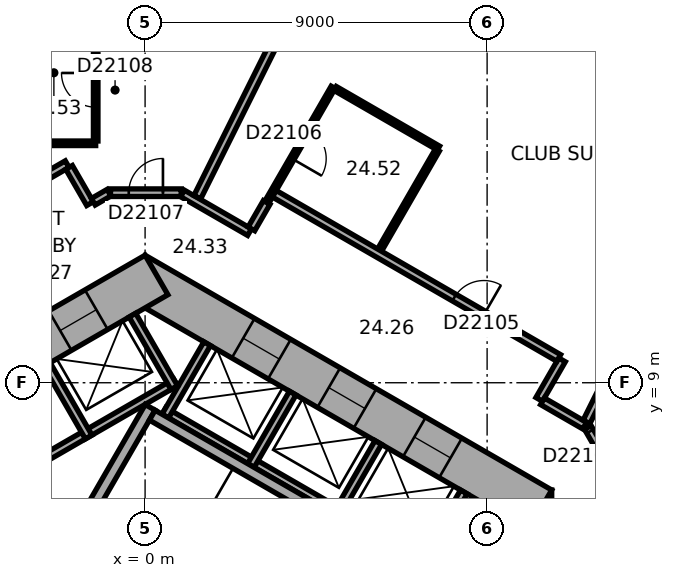
"""IFC4 building model, lengths in metres.
Left out: names, types, materials, properties, quantities, classifications, styles, units other than length and angle.
Written with IfcOpenShell. Run it as: python <this file> out.ifc"""

import sys

from ifc_helpers import new_model, si_unit, direction, frame, frame_2d, origin, place, context, subcontext, project, spatial, rectangle, extrude, element, fill, save


model = new_model("IFC4")
c1 = context("Model", 3, precision=1e-05, world=origin(), true_north=direction((0.0, 1.0)))
c2 = subcontext(c1, "Body", "Model", "MODEL_VIEW")
j1 = project(units=[si_unit("LENGTHUNIT", "METRE"), si_unit("PLANEANGLEUNIT", "RADIAN")], contexts=[c1])
p1 = place(None, origin())
s1 = spatial("IfcSite", under=j1, at=p1, CompositionType="ELEMENT")
p2 = place(p1, origin())
s2 = spatial("IfcBuilding", under=s1, at=p2, CompositionType="ELEMENT")
p3 = place(p2, frame((0.0, 0.0, 103.4)))
s3 = spatial("IfcBuildingStorey", under=s2, at=p3, CompositionType="ELEMENT", Elevation=103.4)
p4 = place(p3, frame((10.1, -6.177, 0.0), z_axis=(0.0, 0.0, 1.0), x_axis=(0.0, 1.0, 0.0)))
e1 = element("IfcWall", 1, at=p4, inside=s3, PredefinedType="SHEAR", context=c2, shape_type="SweptSolid", body=[
    extrude(rectangle(XDim=12.355, YDim=1.2, at=frame_2d((6.177, 0.0))), origin(), (0.0, 0.0, 1.0), 3.3),
])
p5 = place(p4, frame((6.378, 0.0, 0.0)))
e2 = element("IfcOpeningElement", 2, at=p5, cuts=e1, PredefinedType="OPENING", context=c2, shape_type="SweptSolid", body=[
    extrude(rectangle(XDim=1.5, YDim=2.1, at=frame_2d((0.75, 1.05))), frame((0.0, 0.61, 0.0), z_axis=(0.0, -1.0, 0.0), x_axis=(1.0, 0.0, 0.0)), (0.0, 0.0, 1.0), 1.22),
])
p6 = place(p4, frame((1.828, 0.0, 0.0)))
e3 = element("IfcOpeningElement", 3, at=p6, cuts=e1, PredefinedType="OPENING", context=c2, shape_type="SweptSolid", body=[
    extrude(rectangle(XDim=1.1, YDim=2.1, at=frame_2d((0.55, 1.05))), frame((0.0, 0.61, 0.0), z_axis=(0.0, -1.0, 0.0), x_axis=(1.0, 0.0, 0.0)), (0.0, 0.0, 1.0), 1.22),
])
p7 = place(p4, frame((4.427, 0.0, 0.0)))
e4 = element("IfcOpeningElement", 4, at=p7, cuts=e1, PredefinedType="OPENING", context=c2, shape_type="SweptSolid", body=[
    extrude(rectangle(XDim=1.1, YDim=2.1, at=frame_2d((0.55, 1.05))), frame((0.0, 0.61, 0.0), z_axis=(0.0, -1.0, 0.0), x_axis=(1.0, 0.0, 0.0)), (0.0, 0.0, 1.0), 1.22),
])
p8 = place(p3, frame((10.4, 5.658, 0.0), z_axis=(0.0, 0.0, 1.0), x_axis=(-0.866021384402, 0.500006961711, 0.0)))
e5 = element("IfcWall", 5, at=p8, inside=s3, PredefinedType="SHEAR", context=c2, shape_type="SweptSolid", body=[
    extrude(rectangle(XDim=12.355, YDim=1.2, at=frame_2d((6.178, 0.0))), origin(), (0.0, 0.0, 1.0), 3.3),
])
p9 = place(p8, frame((2.728, 0.0, 0.0)))
e6 = element("IfcOpeningElement", 6, at=p9, cuts=e5, PredefinedType="OPENING", context=c2, shape_type="SweptSolid", body=[
    extrude(rectangle(XDim=1.1, YDim=2.1, at=frame_2d((0.55, 1.05))), frame((0.0, 0.61, 0.0), z_axis=(0.0, -1.0, 0.0), x_axis=(1.0, 0.0, 0.0)), (0.0, 0.0, 1.0), 1.22),
])
p10 = place(p8, frame((5.328, 0.0, 0.0)))
e7 = element("IfcOpeningElement", 7, at=p10, cuts=e5, PredefinedType="OPENING", context=c2, shape_type="SweptSolid", body=[
    extrude(rectangle(XDim=1.1, YDim=2.1, at=frame_2d((0.55, 1.05))), frame((0.0, 0.61, 0.0), z_axis=(0.0, -1.0, 0.0), x_axis=(1.0, 0.0, 0.0)), (0.0, 0.0, 1.0), 1.22),
])
p11 = place(p8, frame((7.928, 0.0, 0.0)))
e8 = element("IfcOpeningElement", 8, at=p11, cuts=e5, PredefinedType="OPENING", context=c2, shape_type="SweptSolid", body=[
    extrude(rectangle(XDim=1.1, YDim=2.1, at=frame_2d((0.55, 1.05))), frame((0.0, 0.61, 0.0), z_axis=(0.0, -1.0, 0.0), x_axis=(1.0, 0.0, 0.0)), (0.0, 0.0, 1.0), 1.22),
])
p12 = place(p3, frame((0.3, 11.836, 0.0), z_axis=(0.0, 0.0, 1.0), x_axis=(-0.866021384402, -0.500006961711, 0.0)))
e9 = element("IfcWall", 9, at=p12, inside=s3, PredefinedType="SHEAR", context=c2, shape_type="SweptSolid", body=[
    extrude(rectangle(XDim=12.355, YDim=1.2, at=frame_2d((6.178, 0.0))), origin(), (0.0, 0.0, 1.0), 3.3),
])
p13 = place(p12, frame((6.378, 0.0, 0.0)))
e10 = element("IfcOpeningElement", 10, at=p13, cuts=e9, PredefinedType="OPENING", context=c2, shape_type="SweptSolid", body=[
    extrude(rectangle(XDim=1.5, YDim=2.1, at=frame_2d((0.75, 1.05))), frame((0.0, 0.61, 0.0), z_axis=(0.0, -1.0, 0.0), x_axis=(1.0, 0.0, 0.0)), (0.0, 0.0, 1.0), 1.22),
])
p14 = place(p12, frame((1.828, 0.0, 0.0)))
e11 = element("IfcOpeningElement", 11, at=p14, cuts=e9, PredefinedType="OPENING", context=c2, shape_type="SweptSolid", body=[
    extrude(rectangle(XDim=1.1, YDim=2.1, at=frame_2d((0.55, 1.05))), frame((0.0, 0.61, 0.0), z_axis=(0.0, -1.0, 0.0), x_axis=(1.0, 0.0, 0.0)), (0.0, 0.0, 1.0), 1.22),
])
p15 = place(p3, frame((20.63, 15.47, 0.0), z_axis=(0.0, 0.0, 1.0), x_axis=(-0.894934518609, 0.446197498203, 0.0)))
e12 = element("IfcWall", 12, at=p15, inside=s3, PredefinedType="STANDARD", context=c2, shape_type="SweptSolid", body=[
    extrude(rectangle(XDim=21.246, YDim=0.2, at=frame_2d((10.623, 0.0))), origin(), (0.0, 0.0, 1.0), 3.3),
])
p16 = place(p15, frame((1.553, 0.0, 0.8)))
e13 = element("IfcOpeningElement", 13, at=p16, cuts=e12, PredefinedType="OPENING", context=c2, shape_type="SweptSolid", body=[
    extrude(rectangle(XDim=2.4, YDim=1.7, at=frame_2d((1.2, 0.85))), frame((0.0, 0.11, 0.0), z_axis=(0.0, -1.0, 0.0), x_axis=(1.0, 0.0, 0.0)), (0.0, 0.0, 1.0), 0.22),
])
p17 = place(p15, frame((5.488, 0.0, 0.8)))
e14 = element("IfcOpeningElement", 14, at=p17, cuts=e12, PredefinedType="OPENING", context=c2, shape_type="SweptSolid", body=[
    extrude(rectangle(XDim=2.4, YDim=1.7, at=frame_2d((1.2, 0.85))), frame((0.0, 0.11, 0.0), z_axis=(0.0, -1.0, 0.0), x_axis=(1.0, 0.0, 0.0)), (0.0, 0.0, 1.0), 0.22),
])
p18 = place(p15, frame((9.422, 0.0, 0.8)))
e15 = element("IfcOpeningElement", 15, at=p18, cuts=e12, PredefinedType="OPENING", context=c2, shape_type="SweptSolid", body=[
    extrude(rectangle(XDim=2.4, YDim=1.7, at=frame_2d((1.2, 0.85))), frame((0.0, 0.11, 0.0), z_axis=(0.0, -1.0, 0.0), x_axis=(1.0, 0.0, 0.0)), (0.0, 0.0, 1.0), 0.22),
])
p19 = place(p15, frame((13.357, 0.0, 0.8)))
e16 = element("IfcOpeningElement", 16, at=p19, cuts=e12, PredefinedType="OPENING", context=c2, shape_type="SweptSolid", body=[
    extrude(rectangle(XDim=2.4, YDim=1.7, at=frame_2d((1.2, 0.85))), frame((0.0, 0.11, 0.0), z_axis=(0.0, -1.0, 0.0), x_axis=(1.0, 0.0, 0.0)), (0.0, 0.0, 1.0), 0.22),
])
p20 = place(p15, frame((17.292, 0.0, 0.8)))
e17 = element("IfcOpeningElement", 17, at=p20, cuts=e12, PredefinedType="OPENING", context=c2, shape_type="SweptSolid", body=[
    extrude(rectangle(XDim=2.4, YDim=1.7, at=frame_2d((1.2, 0.85))), frame((0.0, 0.11, 0.0), z_axis=(0.0, -1.0, 0.0), x_axis=(1.0, 0.0, 0.0)), (0.0, 0.0, 1.0), 0.22),
])
p21 = place(p3, frame((7.424, 4.259, 0.0), z_axis=(0.0, 0.0, 1.0), x_axis=(-0.866026010844, 0.49999894854, 0.0)))
e18 = element("IfcWall", 18, at=p21, inside=s3, PredefinedType="PARTITIONING", context=c2, shape_type="SweptSolid", body=[
    extrude(rectangle(XDim=8.0, YDim=0.2, at=frame_2d((4.0, 0.0))), origin(), (0.0, 0.0, 1.0), 3.05),
])
for number, where, z_axis, x_axis in (
    (19, (7.287, 4.222, 0.0), (0.0, 0.0, 1.0), (0.5, 0.866, 0.0)),
    (20, (5.036, 5.522, 0.0), (0.0, 0.0, 1.0), (0.5, 0.866, 0.0)),
    (21, (2.784, 6.822, 0.0), (0.0, 0.0, 1.0), (0.5, 0.866, 0.0)),
    (22, (0.532, 8.122, 0.0), (0.0, 0.0, 1.0), (0.5, 0.866, 0.0)),
):
    element("IfcWall", number, at=place(p3, frame(where, z_axis=z_axis, x_axis=x_axis)), inside=s3, PredefinedType="PARTITIONING", context=c2, shape_type="SweptSolid", body=[
        extrude(rectangle(XDim=2.2, YDim=0.2, at=frame_2d((1.1, 0.0))), origin(), (0.0, 0.0, 1.0), 3.05),
    ])
p22 = place(p3, frame((0.803, 9.009, 0.0), z_axis=(0.0, 0.0, 1.0), x_axis=(-0.866028230842, -0.499995103361, 0.0)))
e23 = element("IfcWall", 23, at=p22, inside=s3, PredefinedType="PARTITIONING", context=c2, shape_type="SweptSolid", body=[
    extrude(rectangle(XDim=5.4, YDim=0.2, at=frame_2d((2.7, 0.0))), origin(), (0.0, 0.0, 1.0), 3.05),
])
p23 = place(p3, frame((0.767, 8.872, 0.0), z_axis=(0.0, 0.0, 1.0), x_axis=(-0.499994660107, 0.866028486751, 0.0)))
e24 = element("IfcWall", 24, at=p23, inside=s3, PredefinedType="PARTITIONING", context=c2, shape_type="SweptSolid", body=[
    extrude(rectangle(XDim=2.2, YDim=0.2, at=frame_2d((1.1, 0.0))), origin(), (0.0, 0.0, 1.0), 3.05),
])
p24 = place(p3, frame((-1.485, 7.572, 0.0), z_axis=(0.0, 0.0, 1.0), x_axis=(-0.50002983664, 0.866008176907, 0.0)))
e25 = element("IfcWall", 25, at=p24, inside=s3, PredefinedType="PARTITIONING", context=c2, shape_type="SweptSolid", body=[
    extrude(rectangle(XDim=2.2, YDim=0.2, at=frame_2d((1.1, 0.0))), origin(), (0.0, 0.0, 1.0), 3.05),
])
p25 = place(p3, frame((-2.216, 4.282, 0.0), z_axis=(0.0, 0.0, 1.0), x_axis=(0.499977259774, 0.866038532462, 0.0)))
e26 = element("IfcWall", 26, at=p25, inside=s3, PredefinedType="SHEAR", context=c2, shape_type="SweptSolid", body=[
    extrude(rectangle(XDim=4.7, YDim=0.3, at=frame_2d((2.35, 0.0))), origin(), (0.0, 0.0, 1.0), 3.05),
])
p26 = place(p3, frame((6.303, 4.617, 0.0), z_axis=(0.0, 0.0, 1.0), x_axis=(-0.866027801685, 0.499995846692, 0.0)))
e27 = element("IfcWall", 27, at=p26, inside=s3, PredefinedType="SHEAR", context=c2, shape_type="SweptSolid", body=[
    extrude(rectangle(XDim=7.06, YDim=0.3, at=frame_2d((3.53, 0.0))), origin(), (0.0, 0.0, 1.0), 3.05),
])
p27 = place(p3, frame((-2.05, 14.752, 0.0), z_axis=(0.0, 0.0, 1.0), x_axis=(-0.866030936828, -0.499990416364, 0.0)))
e28 = element("IfcWall", 28, at=p27, inside=s3, PredefinedType="PARTITIONING", context=c2, shape_type="SweptSolid", body=[
    extrude(rectangle(XDim=3.102, YDim=0.2, at=frame_2d((1.551, 0.0))), origin(), (0.0, 0.0, 1.0), 3.05),
])
p28 = place(p3, frame((-1.449, 13.712, 0.0), z_axis=(0.0, 0.0, 1.0), x_axis=(-0.499978356969, 0.866037899034, 0.0)))
e29 = element("IfcWall", 29, at=p28, inside=s3, PredefinedType="PARTITIONING", context=c2, shape_type="SweptSolid", body=[
    extrude(rectangle(XDim=1.101, YDim=0.2, at=frame_2d((0.551, 0.0))), origin(), (0.0, 0.0, 1.0), 3.05),
])
p29 = place(p3, frame((-1.3, 15.301, 0.0), z_axis=(0.0, 0.0, 1.0), x_axis=(-1.0, 0.0, 0.0)))
e30 = element("IfcWall", 30, at=p29, inside=s3, PredefinedType="PARTITIONING", context=c2, shape_type="SweptSolid", body=[
    extrude(rectangle(XDim=1.661, YDim=0.12, at=frame_2d((0.831, 0.0))), origin(), (0.0, 0.0, 1.0), 3.05),
])
p30 = place(p3, frame((-1.3, 18.041, 0.0), z_axis=(0.0, 0.0, 1.0), x_axis=(0.0, -1.0, 0.0)))
e31 = element("IfcWall", 31, at=p30, inside=s3, PredefinedType="PARTITIONING", context=c2, shape_type="SweptSolid", body=[
    extrude(rectangle(XDim=2.68, YDim=0.12, at=frame_2d((1.34, 0.0))), origin(), (0.0, 0.0, 1.0), 3.05),
])
p31 = place(p30, frame((0.89, 0.0, 0.0)))
e32 = element("IfcOpeningElement", 32, at=p31, cuts=e31, PredefinedType="OPENING", context=c2, shape_type="SweptSolid", body=[
    extrude(rectangle(XDim=0.9, YDim=2.1, at=frame_2d((0.45, 1.05))), frame((0.0, 0.07, 0.0), z_axis=(0.0, -1.0, 0.0), x_axis=(1.0, 0.0, 0.0)), (0.0, 0.0, 1.0), 0.14),
])
p32 = place(p3, frame((-0.95, 14.001, 0.0), z_axis=(0.0, 0.0, 1.0), x_axis=(-0.86609177584, -0.499885022602, 0.0)))
e33 = element("IfcWall", 33, at=p32, inside=s3, PredefinedType="PARTITIONING", context=c2, shape_type="SweptSolid", body=[
    extrude(rectangle(XDim=0.477, YDim=0.2, at=frame_2d((0.238, 0.0))), origin(), (0.0, 0.0, 1.0), 3.05),
])
p33 = place(p3, frame((0.95, 14.001, 0.0), z_axis=(0.0, 0.0, 1.0), x_axis=(-1.0, 0.0, 0.0)))
e34 = element("IfcWall", 34, at=p33, inside=s3, PredefinedType="PARTITIONING", context=c2, shape_type="SweptSolid", body=[
    extrude(rectangle(XDim=1.86, YDim=0.2, at=frame_2d((0.93, 0.0))), origin(), (0.0, 0.0, 1.0), 3.05),
])
p34 = place(p33, frame((0.48, 0.0, 0.0)))
e35 = element("IfcOpeningElement", 35, at=p34, cuts=e34, PredefinedType="OPENING", context=c2, shape_type="SweptSolid", body=[
    extrude(rectangle(XDim=0.9, YDim=2.1, at=frame_2d((0.45, 1.05))), frame((0.0, 0.11, 0.0), z_axis=(0.0, -1.0, 0.0), x_axis=(1.0, 0.0, 0.0)), (0.0, 0.0, 1.0), 0.22),
])
p35 = place(p3, frame((2.748, 12.962, 0.0), z_axis=(0.0, 0.0, 1.0), x_axis=(-0.866013897511, 0.50001992892, 0.0)))
e36 = element("IfcWall", 36, at=p35, inside=s3, PredefinedType="PARTITIONING", context=c2, shape_type="SweptSolid", body=[
    extrude(rectangle(XDim=2.037, YDim=0.2, at=frame_2d((1.018, 0.0))), origin(), (0.0, 0.0, 1.0), 3.05),
])
p36 = place(p3, frame((3.199, 13.743, 0.0), z_axis=(0.0, 0.0, 1.0), x_axis=(-0.500170954823, -0.865926680471, 0.0)))
e37 = element("IfcWall", 37, at=p36, inside=s3, PredefinedType="PARTITIONING", context=c2, shape_type="SweptSolid", body=[
    extrude(rectangle(XDim=0.801, YDim=0.2, at=frame_2d((0.4, 0.0))), origin(), (0.0, 0.0, 1.0), 3.05),
])
p37 = place(p3, frame((3.232, 13.8, 0.0), z_axis=(0.0, 0.0, 1.0), x_axis=(0.499993265928, 0.866029291668, 0.0)))
e38 = element("IfcWall", 38, at=p37, inside=s3, PredefinedType="PARTITIONING", context=c2, shape_type="SweptSolid", body=[
    extrude(rectangle(XDim=3.434, YDim=0.12, at=frame_2d((1.717, 0.0))), origin(), (0.0, 0.0, 1.0), 3.05),
])
p38 = place(p37, frame((1.267, 0.0, 0.0)))
e39 = element("IfcOpeningElement", 39, at=p38, cuts=e38, PredefinedType="OPENING", context=c2, shape_type="SweptSolid", body=[
    extrude(rectangle(XDim=0.9, YDim=2.1, at=frame_2d((0.45, 1.05))), frame((0.0, 0.07, 0.0), z_axis=(0.0, -1.0, 0.0), x_axis=(1.0, 0.0, 0.0)), (0.0, 0.0, 1.0), 0.14),
])
p39 = place(p3, frame((5.001, 16.744, 0.0), z_axis=(0.0, 0.0, 1.0), x_axis=(0.866009488468, -0.500027565123, 0.0)))
e40 = element("IfcWall", 40, at=p39, inside=s3, PredefinedType="PARTITIONING", context=c2, shape_type="SweptSolid", body=[
    extrude(rectangle(XDim=3.14, YDim=0.12, at=frame_2d((1.57, 0.0))), origin(), (0.0, 0.0, 1.0), 3.05),
])
p40 = place(p3, frame((5.351, 21.859, 0.0), z_axis=(0.0, 0.0, 1.0), x_axis=(-0.446205309328, -0.894930624086, 0.0)))
e41 = element("IfcWall", 41, at=p40, inside=s3, PredefinedType="PARTITIONING", context=c2, shape_type="SweptSolid", body=[
    extrude(rectangle(XDim=8.913, YDim=0.2, at=frame_2d((4.457, 0.0))), origin(), (0.0, 0.0, 1.0), 2.6),
])
p41 = place(p3, frame((7.69, 15.122, 0.0), z_axis=(0.0, 0.0, 1.0), x_axis=(-0.499991248344, -0.866030456496, 0.0)))
e42 = element("IfcWall", 42, at=p41, inside=s3, PredefinedType="PARTITIONING", context=c2, shape_type="SweptSolid", body=[
    extrude(rectangle(XDim=3.04, YDim=0.12, at=frame_2d((1.52, 0.0))), origin(), (0.0, 0.0, 1.0), 3.05),
])
p42 = place(p3, frame((10.371, 8.561, 0.0), z_axis=(0.0, 0.0, 1.0), x_axis=(0.499986357472, 0.866033280158, 0.0)))
e43 = element("IfcWall", 43, at=p42, inside=s3, PredefinedType="PARTITIONING", context=c2, shape_type="SweptSolid", body=[
    extrude(rectangle(XDim=1.201, YDim=0.2, at=frame_2d((0.601, 0.0))), origin(), (0.0, 0.0, 1.0), 3.05),
])
p43 = place(p3, frame((10.885, 9.652, 0.0), z_axis=(0.0, 0.0, 1.0), x_axis=(-0.866033630405, 0.499985750804, 0.0)))
e44 = element("IfcWall", 44, at=p43, inside=s3, PredefinedType="PARTITIONING", context=c2, shape_type="SweptSolid", body=[
    extrude(rectangle(XDim=8.642, YDim=0.2, at=frame_2d((4.321, 0.0))), origin(), (0.0, 0.0, 1.0), 3.05),
])
p44 = place(p43, frame((2.276, 0.0, 0.0)))
e45 = element("IfcOpeningElement", 45, at=p44, cuts=e44, PredefinedType="OPENING", context=c2, shape_type="SweptSolid", body=[
    extrude(rectangle(XDim=0.9, YDim=2.1, at=frame_2d((0.45, 1.05))), frame((0.0, 0.11, 0.0), z_axis=(0.0, -1.0, 0.0), x_axis=(1.0, 0.0, 0.0)), (0.0, 0.0, 1.0), 0.22),
])
p45 = place(p3, frame((11.566, 7.871, 0.0), z_axis=(0.0, 0.0, 1.0), x_axis=(-0.866004557827, 0.500036104519, 0.0)))
e46 = element("IfcWall", 46, at=p45, inside=s3, PredefinedType="PARTITIONING", context=c2, shape_type="SweptSolid", body=[
    extrude(rectangle(XDim=1.28, YDim=0.2, at=frame_2d((0.64, 0.0))), origin(), (0.0, 0.0, 1.0), 3.05),
])
p46 = place(p3, frame((12.58, 6.212, 0.0), z_axis=(0.0, 0.0, 1.0), x_axis=(-0.500063286585, 0.865988862174, 0.0)))
e47 = element("IfcWall", 47, at=p46, inside=s3, PredefinedType="PARTITIONING", context=c2, shape_type="SweptSolid", body=[
    extrude(rectangle(XDim=1.86, YDim=0.2, at=frame_2d((0.93, 0.0))), origin(), (0.0, 0.0, 1.0), 3.05),
])
p47 = place(p46, frame((0.842, 0.0, 0.0)))
e48 = element("IfcOpeningElement", 48, at=p47, cuts=e47, PredefinedType="OPENING", context=c2, shape_type="SweptSolid", body=[
    extrude(rectangle(XDim=0.9, YDim=2.1, at=frame_2d((0.45, 1.05))), frame((0.0, 0.11, 0.0), z_axis=(0.0, -1.0, 0.0), x_axis=(1.0, 0.0, 0.0)), (0.0, 0.0, 1.0), 0.22),
])
p48 = place(p3, frame((15.915, 16.592, 0.0), z_axis=(0.0, 0.0, 1.0), x_axis=(-0.446199736347, -0.894933402709, 0.0)))
e49 = element("IfcWall", 49, at=p48, inside=s3, PredefinedType="PARTITIONING", context=c2, shape_type="SweptSolid", body=[
    extrude(rectangle(XDim=9.635, YDim=0.2, at=frame_2d((4.817, 0.0))), origin(), (0.0, 0.0, 1.0), 3.05),
])
p49 = place(p9, origin())
e50 = element("IfcDoor", 50, at=p49, inside=s3, OperationType="DOUBLE_DOOR_SLIDING", PredefinedType="DOOR", context=c2, shape_type="SweptSolid", body=[
    extrude(rectangle(XDim=1.1, YDim=2.1, at=frame_2d((0.55, 1.05))), frame((0.0, 0.025, 0.0), z_axis=(0.0, -1.0, 0.0), x_axis=(1.0, 0.0, 0.0)), (0.0, 0.0, 1.0), 0.05),
])
fill(e6, e50)
p50 = place(p10, origin())
e51 = element("IfcDoor", 51, at=p50, inside=s3, OperationType="DOUBLE_DOOR_SLIDING", PredefinedType="DOOR", context=c2, shape_type="SweptSolid", body=[
    extrude(rectangle(XDim=1.1, YDim=2.1, at=frame_2d((0.55, 1.05))), frame((0.0, 0.025, 0.0), z_axis=(0.0, -1.0, 0.0), x_axis=(1.0, 0.0, 0.0)), (0.0, 0.0, 1.0), 0.05),
])
fill(e7, e51)
p51 = place(p11, origin())
e52 = element("IfcDoor", 52, at=p51, inside=s3, OperationType="DOUBLE_DOOR_SLIDING", PredefinedType="DOOR", context=c2, shape_type="SweptSolid", body=[
    extrude(rectangle(XDim=1.1, YDim=2.1, at=frame_2d((0.55, 1.05))), frame((0.0, 0.025, 0.0), z_axis=(0.0, -1.0, 0.0), x_axis=(1.0, 0.0, 0.0)), (0.0, 0.0, 1.0), 0.05),
])
fill(e8, e52)
p52 = place(p14, origin())
e53 = element("IfcDoor", 53, at=p52, inside=s3, OperationType="DOUBLE_DOOR_SLIDING", PredefinedType="DOOR", context=c2, shape_type="SweptSolid", body=[
    extrude(rectangle(XDim=1.1, YDim=2.1, at=frame_2d((0.55, 1.05))), frame((0.0, 0.025, 0.0), z_axis=(0.0, -1.0, 0.0), x_axis=(1.0, 0.0, 0.0)), (0.0, 0.0, 1.0), 0.05),
])
fill(e11, e53)
p53 = place(p47, origin())
e54 = element("IfcDoor", 54, at=p53, inside=s3, OperationType="SINGLE_SWING_LEFT", PredefinedType="DOOR", context=c2, shape_type="SweptSolid", body=[
    extrude(rectangle(XDim=0.9, YDim=2.1, at=frame_2d((0.45, 1.05))), frame((0.0, 0.025, 0.0), z_axis=(0.0, -1.0, 0.0), x_axis=(1.0, 0.0, 0.0)), (0.0, 0.0, 1.0), 0.05),
])
fill(e48, e54)
p54 = place(p44, origin())
e55 = element("IfcDoor", 55, at=p54, inside=s3, OperationType="SINGLE_SWING_LEFT", PredefinedType="DOOR", context=c2, shape_type="SweptSolid", body=[
    extrude(rectangle(XDim=0.9, YDim=2.1, at=frame_2d((0.45, 1.05))), frame((0.0, 0.025, 0.0), z_axis=(0.0, -1.0, 0.0), x_axis=(1.0, 0.0, 0.0)), (0.0, 0.0, 1.0), 0.05),
])
fill(e45, e55)
p55 = place(p38, origin())
e56 = element("IfcDoor", 56, at=p55, inside=s3, OperationType="SINGLE_SWING_LEFT", PredefinedType="DOOR", context=c2, shape_type="SweptSolid", body=[
    extrude(rectangle(XDim=0.9, YDim=2.1, at=frame_2d((0.45, 1.05))), frame((0.0, 0.025, 0.0), z_axis=(0.0, -1.0, 0.0), x_axis=(1.0, 0.0, 0.0)), (0.0, 0.0, 1.0), 0.05),
])
fill(e39, e56)
p56 = place(p34, origin())
e57 = element("IfcDoor", 57, at=p56, inside=s3, OperationType="SINGLE_SWING_LEFT", PredefinedType="DOOR", context=c2, shape_type="SweptSolid", body=[
    extrude(rectangle(XDim=0.9, YDim=2.1, at=frame_2d((0.45, 1.05))), frame((0.0, 0.025, 0.0), z_axis=(0.0, -1.0, 0.0), x_axis=(1.0, 0.0, 0.0)), (0.0, 0.0, 1.0), 0.05),
])
fill(e35, e57)
p57 = place(p31, origin())
e58 = element("IfcDoor", 58, at=p57, inside=s3, OperationType="SINGLE_SWING_LEFT", PredefinedType="DOOR", context=c2, shape_type="SweptSolid", body=[
    extrude(rectangle(XDim=0.9, YDim=2.1, at=frame_2d((0.45, 1.05))), frame((0.0, 0.025, 0.0), z_axis=(0.0, -1.0, 0.0), x_axis=(1.0, 0.0, 0.0)), (0.0, 0.0, 1.0), 0.05),
])
fill(e32, e58)
save(model, sys.argv[1])
